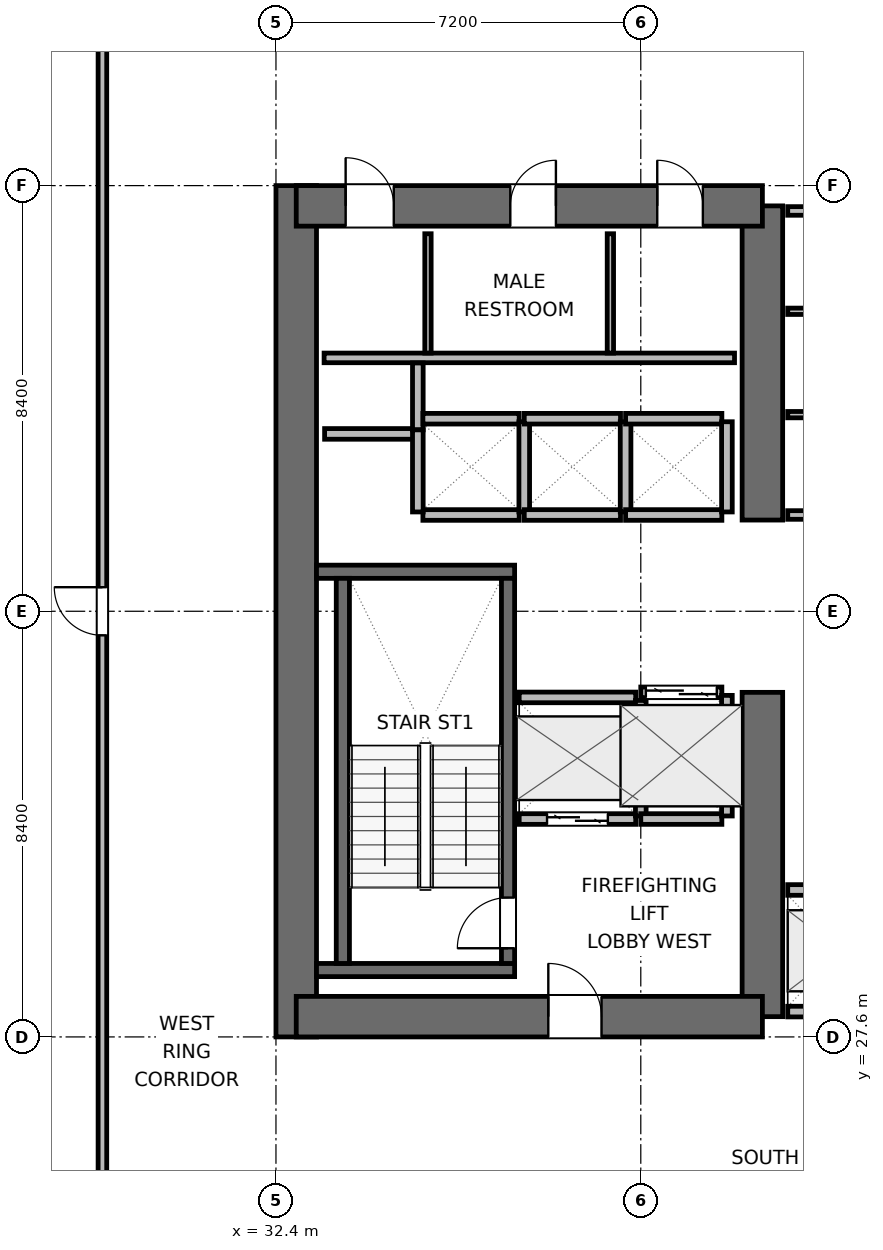
"""IFC4 building model, lengths in metres.
Left out: names, types, materials, properties, quantities, classifications, styles, units other than length and angle.
Written with IfcOpenShell. Run it as: python <this file> out.ifc"""

import sys

from ifc_helpers import new_model, si_unit, direction, frame, frame_2d, origin, place, context, subcontext, project, spatial, rectangle, extrude, element, fill, save


model = new_model("IFC4")
c1 = context("Model", 3, precision=1e-05, world=origin(), true_north=direction((0.0, 1.0)))
c2 = subcontext(c1, "Body", "Model", "MODEL_VIEW")
j1 = project(units=[si_unit("LENGTHUNIT", "METRE"), si_unit("PLANEANGLEUNIT", "RADIAN")], contexts=[c1])
p1 = place(None, origin())
s1 = spatial("IfcSite", under=j1, at=p1, CompositionType="ELEMENT")
p2 = place(p1, origin())
s2 = spatial("IfcBuilding", under=s1, at=p2, CompositionType="ELEMENT")
p3 = place(p2, frame((0.0, 0.0, 105.3)))
s3 = spatial("IfcBuildingStorey", under=s2, at=p3, CompositionType="ELEMENT", Elevation=105.3)
p4 = place(p3, frame((32.8, 27.6, 0.0), z_axis=(0.0, 0.0, 1.0), x_axis=(0.0, 1.0, 0.0)))
e1 = element("IfcWall", 1, at=p4, inside=s3, PredefinedType="SHEAR", context=c2, shape_type="SweptSolid", body=[
    extrude(rectangle(XDim=16.8, YDim=0.8, at=frame_2d((8.4, 0.0))), origin(), (0.0, 0.0, 1.0), 3.9),
])
p5 = place(p3, frame((42.0, 28.0, 0.0), z_axis=(0.0, 0.0, 1.0), x_axis=(0.0, 1.0, 0.0)))
e2 = element("IfcWall", 2, at=p5, inside=s3, PredefinedType="SHEAR", context=c2, shape_type="SweptSolid", body=[
    extrude(rectangle(XDim=6.4, YDim=0.8, at=frame_2d((3.2, 0.0))), origin(), (0.0, 0.0, 1.0), 3.9),
])
p6 = place(p3, frame((42.0, 37.8, 0.0), z_axis=(0.0, 0.0, 1.0), x_axis=(0.0, 1.0, 0.0)))
e3 = element("IfcWall", 3, at=p6, inside=s3, PredefinedType="SHEAR", context=c2, shape_type="SweptSolid", body=[
    extrude(rectangle(XDim=6.2, YDim=0.8, at=frame_2d((3.1, 0.0))), origin(), (0.0, 0.0, 1.0), 3.9),
])
p7 = place(p3, frame((32.8, 28.0, 0.0), z_axis=(0.0, 0.0, 1.0), x_axis=(1.0, 0.0, 0.0)))
e4 = element("IfcWall", 4, at=p7, inside=s3, PredefinedType="SHEAR", context=c2, shape_type="SweptSolid", body=[
    extrude(rectangle(XDim=9.2, YDim=0.8, at=frame_2d((4.6, 0.0))), origin(), (0.0, 0.0, 1.0), 3.9),
])
p8 = place(p7, frame((4.975, 0.0, 0.0)))
e5 = element("IfcOpeningElement", 5, at=p8, cuts=e4, PredefinedType="OPENING", context=c2, shape_type="SweptSolid", body=[
    extrude(rectangle(XDim=1.05, YDim=2.04, at=frame_2d((0.525, 1.02))), frame((0.0, 0.41, 0.0), z_axis=(0.0, -1.0, 0.0), x_axis=(1.0, 0.0, 0.0)), (0.0, 0.0, 1.0), 0.82),
])
p9 = place(p3, frame((32.8, 44.0, 0.0), z_axis=(0.0, 0.0, 1.0), x_axis=(1.0, 0.0, 0.0)))
e6 = element("IfcWall", 6, at=p9, inside=s3, PredefinedType="SHEAR", context=c2, shape_type="SweptSolid", body=[
    extrude(rectangle(XDim=9.2, YDim=0.8, at=frame_2d((4.6, 0.0))), origin(), (0.0, 0.0, 1.0), 3.9),
])
p10 = place(p9, frame((0.975, 0.0, 0.0)))
e7 = element("IfcOpeningElement", 7, at=p10, cuts=e6, PredefinedType="OPENING", context=c2, shape_type="SweptSolid", body=[
    extrude(rectangle(XDim=0.95, YDim=2.04, at=frame_2d((0.475, 1.02))), frame((0.0, 0.41, 0.0), z_axis=(0.0, -1.0, 0.0), x_axis=(1.0, 0.0, 0.0)), (0.0, 0.0, 1.0), 0.82),
])
p11 = place(p9, frame((4.225, 0.0, 0.0)))
e8 = element("IfcOpeningElement", 8, at=p11, cuts=e6, PredefinedType="OPENING", context=c2, shape_type="SweptSolid", body=[
    extrude(rectangle(XDim=0.9, YDim=2.02, at=frame_2d((0.45, 1.01))), frame((0.0, 0.41, 0.0), z_axis=(0.0, -1.0, 0.0), x_axis=(1.0, 0.0, 0.0)), (0.0, 0.0, 1.0), 0.82),
])
p12 = place(p9, frame((7.125, 0.0, 0.0)))
e9 = element("IfcOpeningElement", 9, at=p12, cuts=e6, PredefinedType="OPENING", context=c2, shape_type="SweptSolid", body=[
    extrude(rectangle(XDim=0.9, YDim=2.02, at=frame_2d((0.45, 1.01))), frame((0.0, 0.41, 0.0), z_axis=(0.0, -1.0, 0.0), x_axis=(1.0, 0.0, 0.0)), (0.0, 0.0, 1.0), 0.82),
])
for number, where, z_axis, x_axis in (
    (10, (33.2, 28.92, 0.0), (0.0, 0.0, 1.0), (1.0, 0.0, 0.0)),
    (11, (33.2, 36.78, 0.0), (0.0, 0.0, 1.0), (1.0, 0.0, 0.0)),
):
    element("IfcWall", number, at=place(p3, frame(where, z_axis=z_axis, x_axis=x_axis)), inside=s3, PredefinedType="SHEAR", context=c2, shape_type="SweptSolid", body=[
        extrude(rectangle(XDim=3.91, YDim=0.26, at=frame_2d((1.955, 0.0))), origin(), (0.0, 0.0, 1.0), 3.9),
    ])
p13 = place(p3, frame((33.72, 29.05, 0.0), z_axis=(0.0, 0.0, 1.0), x_axis=(0.0, 1.0, 0.0)))
e12 = element("IfcWall", 12, at=p13, inside=s3, PredefinedType="SHEAR", context=c2, shape_type="SweptSolid", body=[
    extrude(rectangle(XDim=7.6, YDim=0.26, at=frame_2d((3.8, 0.0))), origin(), (0.0, 0.0, 1.0), 3.9),
])
p14 = place(p3, frame((36.98, 29.05, 0.0), z_axis=(0.0, 0.0, 1.0), x_axis=(0.0, 1.0, 0.0)))
e13 = element("IfcWall", 13, at=p14, inside=s3, PredefinedType="SHEAR", context=c2, shape_type="SweptSolid", body=[
    extrude(rectangle(XDim=7.6, YDim=0.26, at=frame_2d((3.8, 0.0))), origin(), (0.0, 0.0, 1.0), 3.9),
])
p15 = place(p14, frame((0.3, 0.0, 0.0)))
e14 = element("IfcOpeningElement", 14, at=p15, cuts=e13, PredefinedType="OPENING", context=c2, shape_type="SweptSolid", body=[
    extrude(rectangle(XDim=1.0, YDim=2.04, at=frame_2d((0.5, 1.02))), frame((0.0, 0.14, 0.0), z_axis=(0.0, -1.0, 0.0), x_axis=(1.0, 0.0, 0.0)), (0.0, 0.0, 1.0), 0.28),
])
p16 = place(p3, frame((33.35, 41.0, 0.0), z_axis=(0.0, 0.0, 1.0), x_axis=(1.0, 0.0, 0.0)))
e15 = element("IfcWall", 15, at=p16, inside=s3, PredefinedType="PLUMBINGWALL", context=c2, shape_type="SweptSolid", body=[
    extrude(rectangle(XDim=8.1, YDim=0.19, at=frame_2d((4.05, 0.0))), origin(), (0.0, 0.0, 1.0), 3.64),
])
for number, where, z_axis, x_axis in (
    (16, (35.4, 41.095, 0.0), (0.0, 0.0, 1.0), (0.0, 1.0, 0.0)),
    (17, (39.0, 41.095, 0.0), (0.0, 0.0, 1.0), (0.0, 1.0, 0.0)),
):
    element("IfcWall", number, at=place(p3, frame(where, z_axis=z_axis, x_axis=x_axis)), inside=s3, PredefinedType="PARTITIONING", context=c2, shape_type="SweptSolid", body=[
        extrude(rectangle(XDim=2.355, YDim=0.125, at=frame_2d((1.177, 0.0))), origin(), (0.0, 0.0, 1.0), 3.64),
    ])
p17 = place(p3, frame((33.36, 39.5, 0.0), z_axis=(0.0, 0.0, 1.0), x_axis=(1.0, 0.0, 0.0)))
e18 = element("IfcWall", 18, at=p17, inside=s3, PredefinedType="PARTITIONING", context=c2, shape_type="SweptSolid", body=[
    extrude(rectangle(XDim=1.86, YDim=0.21, at=frame_2d((0.93, 0.0))), origin(), (0.0, 0.0, 1.0), 3.64),
])
p18 = place(p3, frame((35.2, 39.58, 0.0), z_axis=(0.0, 0.0, 1.0), x_axis=(0.0, 1.0, 0.0)))
e19 = element("IfcWall", 19, at=p18, inside=s3, PredefinedType="PARTITIONING", context=c2, shape_type="SweptSolid", body=[
    extrude(rectangle(XDim=1.32, YDim=0.21, at=frame_2d((0.66, 0.0))), origin(), (0.0, 0.0, 1.0), 3.64),
])
p19 = place(p3, frame((37.2, 31.9, 0.0), z_axis=(0.0, 0.0, 1.0), x_axis=(1.0, 0.0, 0.0)))
e20 = element("IfcWall", 20, at=p19, inside=s3, PredefinedType="PARTITIONING", context=c2, shape_type="SweptSolid", body=[
    extrude(rectangle(XDim=2.3, YDim=0.21, at=frame_2d((1.15, 0.0))), origin(), (0.0, 0.0, 1.0), 3.64),
])
p20 = place(p19, frame((0.55, 0.0, 0.0)))
e21 = element("IfcOpeningElement", 21, at=p20, cuts=e20, PredefinedType="OPENING", context=c2, shape_type="SweptSolid", body=[
    extrude(rectangle(XDim=1.2, YDim=2.04, at=frame_2d((0.6, 1.02))), frame((0.0, 0.115, 0.0), z_axis=(0.0, -1.0, 0.0), x_axis=(1.0, 0.0, 0.0)), (0.0, 0.0, 1.0), 0.23),
])
p21 = place(p3, frame((37.2, 34.3, 0.0), z_axis=(0.0, 0.0, 1.0), x_axis=(1.0, 0.0, 0.0)))
e22 = element("IfcWall", 22, at=p21, inside=s3, PredefinedType="PARTITIONING", context=c2, shape_type="SweptSolid", body=[
    extrude(rectangle(XDim=2.3, YDim=0.21, at=frame_2d((1.15, 0.0))), origin(), (0.0, 0.0, 1.0), 3.64),
])
p22 = place(p3, frame((39.6, 31.96, 0.0), z_axis=(0.0, 0.0, 1.0), x_axis=(0.0, 1.0, 0.0)))
e23 = element("IfcWall", 23, at=p22, inside=s3, PredefinedType="PARTITIONING", context=c2, shape_type="SweptSolid", body=[
    extrude(rectangle(XDim=2.28, YDim=0.21, at=frame_2d((1.14, 0.0))), origin(), (0.0, 0.0, 1.0), 3.64),
])
p23 = place(p3, frame((39.6, 34.4, 0.0), z_axis=(0.0, 0.0, 1.0), x_axis=(1.0, 0.0, 0.0)))
e24 = element("IfcWall", 24, at=p23, inside=s3, PredefinedType="PARTITIONING", context=c2, shape_type="SweptSolid", body=[
    extrude(rectangle(XDim=1.6, YDim=0.21, at=frame_2d((0.8, 0.0))), origin(), (0.0, 0.0, 1.0), 3.64),
])
p24 = place(p23, frame((0.1, 0.0, 0.0)))
e25 = element("IfcOpeningElement", 25, at=p24, cuts=e24, PredefinedType="OPENING", context=c2, shape_type="SweptSolid", body=[
    extrude(rectangle(XDim=1.4, YDim=2.06, at=frame_2d((0.7, 1.03))), frame((0.0, 0.115, 0.0), z_axis=(0.0, -1.0, 0.0), x_axis=(1.0, 0.0, 0.0)), (0.0, 0.0, 1.0), 0.23),
])
p25 = place(p3, frame((39.6, 31.9, 0.0), z_axis=(0.0, 0.0, 1.0), x_axis=(1.0, 0.0, 0.0)))
e26 = element("IfcWall", 26, at=p25, inside=s3, PredefinedType="PARTITIONING", context=c2, shape_type="SweptSolid", body=[
    extrude(rectangle(XDim=1.6, YDim=0.21, at=frame_2d((0.8, 0.0))), origin(), (0.0, 0.0, 1.0), 3.64),
])
p26 = place(p3, frame((41.3, 31.96, 0.0), z_axis=(0.0, 0.0, 1.0), x_axis=(0.0, 1.0, 0.0)))
e27 = element("IfcWall", 27, at=p26, inside=s3, PredefinedType="PARTITIONING", context=c2, shape_type="SweptSolid", body=[
    extrude(rectangle(XDim=2.38, YDim=0.21, at=frame_2d((1.19, 0.0))), origin(), (0.0, 0.0, 1.0), 3.64),
])
p27 = place(p3, frame((42.5, 30.5, 0.0), z_axis=(0.0, 0.0, 1.0), x_axis=(1.0, 0.0, 0.0)))
e28 = element("IfcWall", 28, at=p27, inside=s3, PredefinedType="PARTITIONING", context=c2, shape_type="SweptSolid", body=[
    extrude(rectangle(XDim=2.1, YDim=0.21, at=frame_2d((1.05, 0.0))), origin(), (0.0, 0.0, 1.0), 3.64),
])
p28 = place(p27, frame((0.5, 0.0, 0.0)))
e29 = element("IfcOpeningElement", 29, at=p28, cuts=e28, PredefinedType="OPENING", context=c2, shape_type="SweptSolid", body=[
    extrude(rectangle(XDim=1.1, YDim=2.04, at=frame_2d((0.55, 1.02))), frame((0.0, 0.115, 0.0), z_axis=(0.0, -1.0, 0.0), x_axis=(1.0, 0.0, 0.0)), (0.0, 0.0, 1.0), 0.23),
])
p29 = place(p3, frame((42.5, 28.1, 0.0), z_axis=(0.0, 0.0, 1.0), x_axis=(1.0, 0.0, 0.0)))
e30 = element("IfcWall", 30, at=p29, inside=s3, PredefinedType="PARTITIONING", context=c2, shape_type="SweptSolid", body=[
    extrude(rectangle(XDim=2.1, YDim=0.21, at=frame_2d((1.05, 0.0))), origin(), (0.0, 0.0, 1.0), 2.525),
])
for number, where, z_axis, x_axis in (
    (31, (35.3, 37.9, 0.0), (0.0, 0.0, 1.0), (1.0, 0.0, 0.0)),
    (32, (35.3, 39.8, 0.0), (0.0, 0.0, 1.0), (1.0, 0.0, 0.0)),
):
    element("IfcWall", number, at=place(p3, frame(where, z_axis=z_axis, x_axis=x_axis)), inside=s3, PredefinedType="PARTITIONING", context=c2, shape_type="SweptSolid", body=[
        extrude(rectangle(XDim=1.9, YDim=0.21, at=frame_2d((0.95, 0.0))), origin(), (0.0, 0.0, 1.0), 3.64),
    ])
p30 = place(p3, frame((35.2, 37.96, 0.0), z_axis=(0.0, 0.0, 1.0), x_axis=(0.0, 1.0, 0.0)))
e33 = element("IfcWall", 33, at=p30, inside=s3, PredefinedType="PARTITIONING", context=c2, shape_type="SweptSolid", body=[
    extrude(rectangle(XDim=1.62, YDim=0.21, at=frame_2d((0.81, 0.0))), origin(), (0.0, 0.0, 1.0), 3.64),
])
p31 = place(p3, frame((37.3, 37.96, 0.0), z_axis=(0.0, 0.0, 1.0), x_axis=(0.0, 1.0, 0.0)))
e34 = element("IfcWall", 34, at=p31, inside=s3, PredefinedType="PARTITIONING", context=c2, shape_type="SweptSolid", body=[
    extrude(rectangle(XDim=1.78, YDim=0.21, at=frame_2d((0.89, 0.0))), origin(), (0.0, 0.0, 1.0), 3.64),
])
for number, where, z_axis, x_axis in (
    (35, (37.3, 37.9, 0.0), (0.0, 0.0, 1.0), (1.0, 0.0, 0.0)),
    (36, (37.3, 39.8, 0.0), (0.0, 0.0, 1.0), (1.0, 0.0, 0.0)),
):
    element("IfcWall", number, at=place(p3, frame(where, z_axis=z_axis, x_axis=x_axis)), inside=s3, PredefinedType="PARTITIONING", context=c2, shape_type="SweptSolid", body=[
        extrude(rectangle(XDim=1.9, YDim=0.21, at=frame_2d((0.95, 0.0))), origin(), (0.0, 0.0, 1.0), 3.64),
    ])
p32 = place(p3, frame((39.3, 37.96, 0.0), z_axis=(0.0, 0.0, 1.0), x_axis=(0.0, 1.0, 0.0)))
e37 = element("IfcWall", 37, at=p32, inside=s3, PredefinedType="PARTITIONING", context=c2, shape_type="SweptSolid", body=[
    extrude(rectangle(XDim=1.78, YDim=0.21, at=frame_2d((0.89, 0.0))), origin(), (0.0, 0.0, 1.0), 3.64),
])
for number, where, z_axis, x_axis in (
    (38, (39.3, 37.9, 0.0), (0.0, 0.0, 1.0), (1.0, 0.0, 0.0)),
    (39, (39.3, 39.8, 0.0), (0.0, 0.0, 1.0), (1.0, 0.0, 0.0)),
):
    element("IfcWall", number, at=place(p3, frame(where, z_axis=z_axis, x_axis=x_axis)), inside=s3, PredefinedType="PARTITIONING", context=c2, shape_type="SweptSolid", body=[
        extrude(rectangle(XDim=1.9, YDim=0.21, at=frame_2d((0.95, 0.0))), origin(), (0.0, 0.0, 1.0), 3.64),
    ])
p33 = place(p3, frame((41.3, 37.96, 0.0), z_axis=(0.0, 0.0, 1.0), x_axis=(0.0, 1.0, 0.0)))
e40 = element("IfcWall", 40, at=p33, inside=s3, PredefinedType="PARTITIONING", context=c2, shape_type="SweptSolid", body=[
    extrude(rectangle(XDim=1.78, YDim=0.21, at=frame_2d((0.89, 0.0))), origin(), (0.0, 0.0, 1.0), 3.64),
])
p34 = place(p3, frame((42.5, 37.9, 0.0), z_axis=(0.0, 0.0, 1.0), x_axis=(1.0, 0.0, 0.0)))
e41 = element("IfcWall", 41, at=p34, inside=s3, PredefinedType="PARTITIONING", context=c2, shape_type="SweptSolid", body=[
    extrude(rectangle(XDim=4.213, YDim=0.17, at=frame_2d((2.106, 0.0))), origin(), (0.0, 0.0, 1.0), 3.64),
])
p35 = place(p3, frame((42.5, 43.9, 0.0), z_axis=(0.0, 0.0, 1.0), x_axis=(1.0, 0.0, 0.0)))
e42 = element("IfcWall", 42, at=p35, inside=s3, PredefinedType="PARTITIONING", context=c2, shape_type="SweptSolid", body=[
    extrude(rectangle(XDim=4.213, YDim=0.17, at=frame_2d((2.106, 0.0))), origin(), (0.0, 0.0, 1.0), 2.525),
])
for number, where, z_axis, x_axis in (
    (43, (42.5, 39.88, 0.0), (0.0, 0.0, 1.0), (1.0, 0.0, 0.0)),
    (44, (42.5, 41.92, 0.0), (0.0, 0.0, 1.0), (1.0, 0.0, 0.0)),
):
    element("IfcWall", number, at=place(p3, frame(where, z_axis=z_axis, x_axis=x_axis)), inside=s3, PredefinedType="PARTITIONING", context=c2, shape_type="SweptSolid", body=[
        extrude(rectangle(XDim=4.213, YDim=0.125, at=frame_2d((2.106, 0.0))), origin(), (0.0, 0.0, 1.0), 3.64),
    ])
p36 = place(p3, frame((28.975, 23.987, 0.0), z_axis=(0.0, 0.0, 1.0), x_axis=(0.0, 1.0, 0.0)))
e45 = element("IfcWall", 45, at=p36, inside=s3, PredefinedType="PARTITIONING", context=c2, shape_type="SweptSolid", body=[
    extrude(rectangle(XDim=24.026, YDim=0.17, at=frame_2d((12.013, 0.0))), origin(), (0.0, 0.0, 1.0), 3.64),
])
p37 = place(p36, frame((11.538, 0.0, 0.0)))
e46 = element("IfcOpeningElement", 46, at=p37, cuts=e45, PredefinedType="OPENING", context=c2, shape_type="SweptSolid", body=[
    extrude(rectangle(XDim=0.95, YDim=2.04, at=frame_2d((0.475, 1.02))), frame((0.0, 0.095, 0.0), z_axis=(0.0, -1.0, 0.0), x_axis=(1.0, 0.0, 0.0)), (0.0, 0.0, 1.0), 0.19),
])
p38 = place(p15, origin())
e47 = element("IfcDoor", 47, at=p38, inside=s3, OperationType="SINGLE_SWING_LEFT", PredefinedType="DOOR", context=c2, shape_type="SweptSolid", body=[
    extrude(rectangle(XDim=1.0, YDim=2.04, at=frame_2d((0.5, 1.02))), frame((0.0, 0.025, 0.0), z_axis=(0.0, -1.0, 0.0), x_axis=(1.0, 0.0, 0.0)), (0.0, 0.0, 1.0), 0.05),
])
fill(e14, e47)
p39 = place(p20, origin())
e48 = element("IfcDoor", 48, at=p39, inside=s3, OperationType="DOUBLE_DOOR_SLIDING", PredefinedType="DOOR", context=c2, shape_type="SweptSolid", body=[
    extrude(rectangle(XDim=1.2, YDim=2.04, at=frame_2d((0.6, 1.02))), frame((0.0, 0.025, 0.0), z_axis=(0.0, -1.0, 0.0), x_axis=(1.0, 0.0, 0.0)), (0.0, 0.0, 1.0), 0.05),
])
fill(e21, e48)
p40 = place(p24, origin())
e49 = element("IfcDoor", 49, at=p40, inside=s3, OperationType="DOUBLE_DOOR_SLIDING", PredefinedType="DOOR", context=c2, shape_type="SweptSolid", body=[
    extrude(rectangle(XDim=1.4, YDim=2.06, at=frame_2d((0.7, 1.03))), frame((0.0, 0.025, 0.0), z_axis=(0.0, -1.0, 0.0), x_axis=(1.0, 0.0, 0.0)), (0.0, 0.0, 1.0), 0.05),
])
fill(e25, e49)
p41 = place(p8, origin())
e50 = element("IfcDoor", 50, at=p41, inside=s3, OperationType="SINGLE_SWING_LEFT", PredefinedType="DOOR", context=c2, shape_type="SweptSolid", body=[
    extrude(rectangle(XDim=1.05, YDim=2.04, at=frame_2d((0.525, 1.02))), frame((0.0, 0.025, 0.0), z_axis=(0.0, -1.0, 0.0), x_axis=(1.0, 0.0, 0.0)), (0.0, 0.0, 1.0), 0.05),
])
fill(e5, e50)
p42 = place(p10, origin())
e51 = element("IfcDoor", 51, at=p42, inside=s3, OperationType="SINGLE_SWING_LEFT", PredefinedType="DOOR", context=c2, shape_type="SweptSolid", body=[
    extrude(rectangle(XDim=0.95, YDim=2.04, at=frame_2d((0.475, 1.02))), frame((0.0, 0.025, 0.0), z_axis=(0.0, -1.0, 0.0), x_axis=(1.0, 0.0, 0.0)), (0.0, 0.0, 1.0), 0.05),
])
fill(e7, e51)
p43 = place(p11, origin())
e52 = element("IfcDoor", 52, at=p43, inside=s3, OperationType="SINGLE_SWING_RIGHT", PredefinedType="DOOR", context=c2, shape_type="SweptSolid", body=[
    extrude(rectangle(XDim=0.9, YDim=2.02, at=frame_2d((0.45, 1.01))), frame((0.0, 0.025, 0.0), z_axis=(0.0, -1.0, 0.0), x_axis=(1.0, 0.0, 0.0)), (0.0, 0.0, 1.0), 0.05),
])
fill(e8, e52)
p44 = place(p12, origin())
e53 = element("IfcDoor", 53, at=p44, inside=s3, OperationType="SINGLE_SWING_LEFT", PredefinedType="DOOR", context=c2, shape_type="SweptSolid", body=[
    extrude(rectangle(XDim=0.9, YDim=2.02, at=frame_2d((0.45, 1.01))), frame((0.0, 0.025, 0.0), z_axis=(0.0, -1.0, 0.0), x_axis=(1.0, 0.0, 0.0)), (0.0, 0.0, 1.0), 0.05),
])
fill(e9, e53)
p45 = place(p37, origin())
e54 = element("IfcDoor", 54, at=p45, inside=s3, OperationType="SINGLE_SWING_RIGHT", PredefinedType="DOOR", context=c2, shape_type="SweptSolid", body=[
    extrude(rectangle(XDim=0.95, YDim=2.04, at=frame_2d((0.475, 1.02))), frame((0.0, 0.025, 0.0), z_axis=(0.0, -1.0, 0.0), x_axis=(1.0, 0.0, 0.0)), (0.0, 0.0, 1.0), 0.05),
])
fill(e46, e54)
save(model, sys.argv[1])
